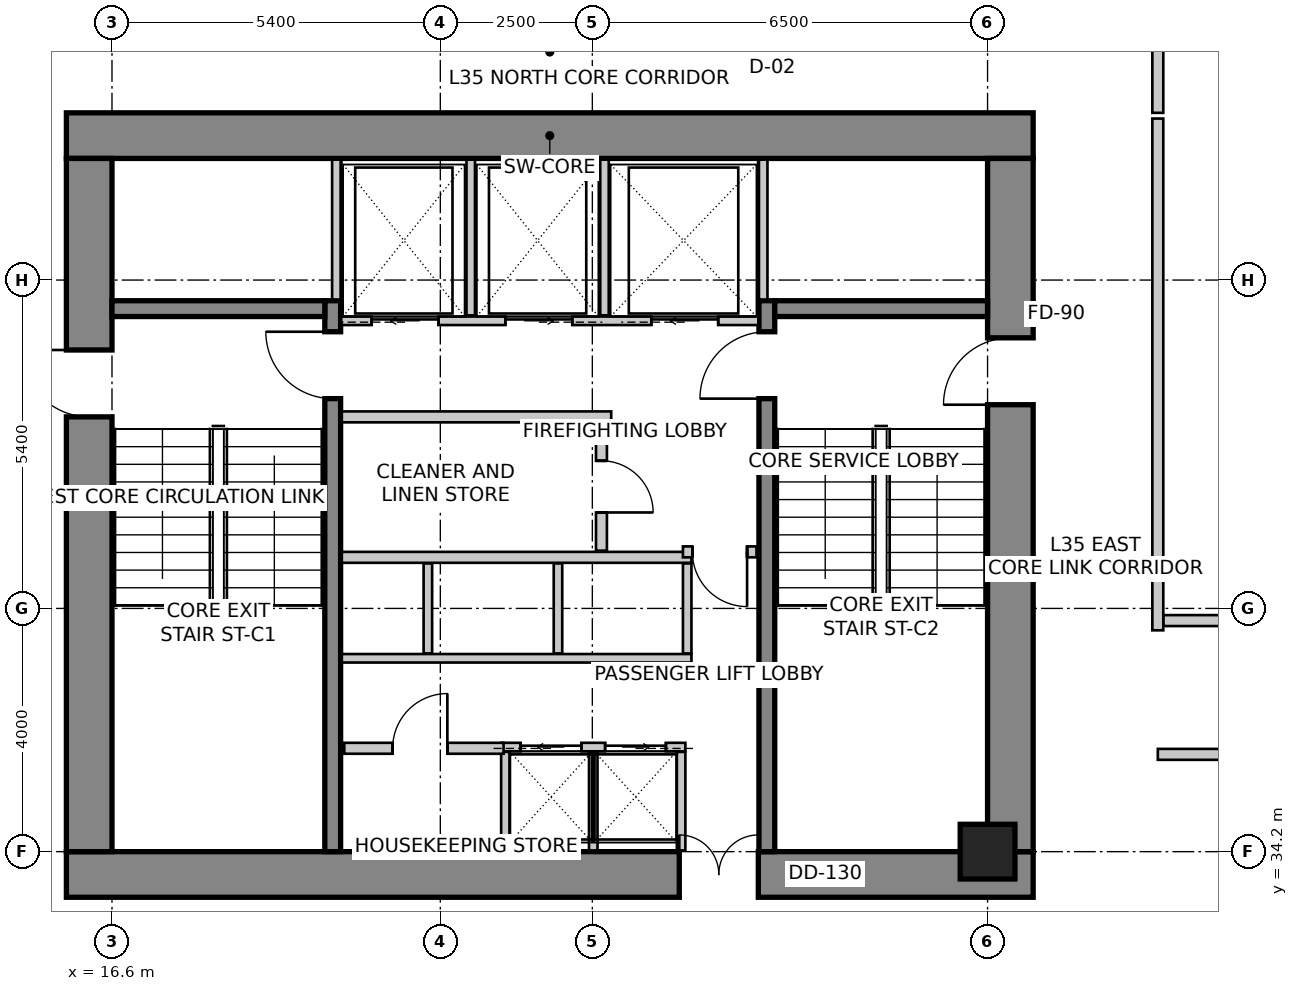
"""IFC4 building model, lengths in metres.
Left out: names, types, materials, properties, quantities, classifications, styles, units other than length and angle.
Written with IfcOpenShell. Run it as: python <this file> out.ifc"""

import sys

from ifc_helpers import new_model, si_unit, direction, frame, frame_2d, origin, origin_2d, place, context, subcontext, project, spatial, rectangle, extrude, source, transform, mapped, element, fill, save


model = new_model("IFC4")
c1 = context("Model", 3, precision=1e-05, world=origin(), true_north=direction((0.0, 1.0)))
c2 = subcontext(c1, "Body", "Model", "MODEL_VIEW")
j1 = project(units=[si_unit("LENGTHUNIT", "METRE"), si_unit("PLANEANGLEUNIT", "RADIAN")], contexts=[c1])
p1 = place(None, origin())
s1 = spatial("IfcSite", under=j1, at=p1, CompositionType="ELEMENT")
p2 = place(p1, origin())
s2 = spatial("IfcBuilding", under=s1, at=p2, CompositionType="ELEMENT")
p3 = place(p2, frame((0.0, 0.0, 143.0)))
s3 = spatial("IfcBuildingStorey", under=s2, at=p3, CompositionType="ELEMENT", Elevation=143.0)
p4 = place(p3, frame((15.85, 45.975, 0.0), z_axis=(0.0, 0.0, 1.0), x_axis=(1.0, 0.0, 0.0)))
e1 = element("IfcWall", 1, at=p4, inside=s3, PredefinedType="SHEAR", context=c2, shape_type="SweptSolid", body=[
    extrude(rectangle(XDim=15.9, YDim=0.75, at=frame_2d((7.95, 0.0))), origin(), (0.0, 0.0, 1.0), 3.6),
])
p5 = place(p3, frame((15.85, 33.825, 0.0), z_axis=(0.0, 0.0, 1.0), x_axis=(1.0, 0.0, 0.0)))
e2 = element("IfcWall", 2, at=p5, inside=s3, PredefinedType="SHEAR", context=c2, shape_type="SweptSolid", body=[
    extrude(rectangle(XDim=15.9, YDim=0.75, at=frame_2d((7.95, 0.0))), origin(), (0.0, 0.0, 1.0), 3.6),
])
m1 = source(origin(), c2, "Body", "SweptSolid", [
    extrude(rectangle(XDim=1.3, YDim=2.15, at=frame_2d((0.65, 1.075))), frame((0.0, 0.385, 0.0), z_axis=(0.0, -1.0, 0.0), x_axis=(1.0, 0.0, 0.0)), (0.0, 0.0, 1.0), 0.77),
])
p6 = place(p5, frame((10.08, 0.0, 0.0)))
e3 = element("IfcOpeningElement", 3, at=p6, cuts=e2, PredefinedType="OPENING", context=c2, shape_type="MappedRepresentation", body=[
    mapped(m1, transform((0.0, 0.0, 0.0), scale=1.0)),
])
p7 = place(p3, frame((16.225, 34.2, 0.0), z_axis=(0.0, 0.0, 1.0), x_axis=(0.0, 1.0, 0.0)))
e4 = element("IfcWall", 4, at=p7, inside=s3, PredefinedType="SHEAR", context=c2, shape_type="SweptSolid", body=[
    extrude(rectangle(XDim=11.4, YDim=0.75, at=frame_2d((5.7, 0.0))), origin(), (0.0, 0.0, 1.0), 3.6),
])
m2 = source(origin(), c2, "Body", "SweptSolid", [
    extrude(rectangle(XDim=1.1, YDim=2.15, at=frame_2d((0.55, 1.075))), frame((0.0, 0.385, 0.0), z_axis=(0.0, -1.0, 0.0), x_axis=(1.0, 0.0, 0.0)), (0.0, 0.0, 1.0), 0.77),
])
p8 = place(p7, frame((7.15, 0.0, 0.0)))
e5 = element("IfcOpeningElement", 5, at=p8, cuts=e4, PredefinedType="OPENING", context=c2, shape_type="MappedRepresentation", body=[
    mapped(m2, transform((0.0, 0.0, 0.0), scale=1.0)),
])
p9 = place(p3, frame((31.375, 34.2, 0.0), z_axis=(0.0, 0.0, 1.0), x_axis=(0.0, 1.0, 0.0)))
e6 = element("IfcWall", 6, at=p9, inside=s3, PredefinedType="SHEAR", context=c2, shape_type="SweptSolid", body=[
    extrude(rectangle(XDim=11.4, YDim=0.75, at=frame_2d((5.7, 0.0))), origin(), (0.0, 0.0, 1.0), 3.6),
])
p10 = place(p9, frame((7.35, 0.0, 0.0)))
e7 = element("IfcOpeningElement", 7, at=p10, cuts=e6, PredefinedType="OPENING", context=c2, shape_type="MappedRepresentation", body=[
    mapped(m2, transform((0.0, 0.0, 0.0), scale=1.0)),
])
p11 = place(p3, frame((20.23, 34.2, 0.0), z_axis=(0.0, 0.0, 1.0), x_axis=(0.0, 1.0, 0.0)))
e8 = element("IfcWall", 8, at=p11, inside=s3, PredefinedType="SHEAR", context=c2, shape_type="SweptSolid", body=[
    extrude(rectangle(XDim=9.06, YDim=0.26, at=frame_2d((4.53, 0.0))), origin(), (0.0, 0.0, 1.0), 3.6),
])
m3 = source(origin(), c2, "Body", "SweptSolid", [
    extrude(rectangle(XDim=1.1, YDim=2.15, at=frame_2d((0.55, 1.075))), frame((0.0, 0.14, 0.0), z_axis=(0.0, -1.0, 0.0), x_axis=(1.0, 0.0, 0.0)), (0.0, 0.0, 1.0), 0.28),
])
p12 = place(p11, frame((7.45, 0.0, 0.0)))
e9 = element("IfcOpeningElement", 9, at=p12, cuts=e8, PredefinedType="OPENING", context=c2, shape_type="MappedRepresentation", body=[
    mapped(m3, transform((0.0, 0.0, 0.0), scale=1.0)),
])
p13 = place(p3, frame((27.37, 34.2, 0.0), z_axis=(0.0, 0.0, 1.0), x_axis=(0.0, 1.0, 0.0)))
e10 = element("IfcWall", 10, at=p13, inside=s3, PredefinedType="SHEAR", context=c2, shape_type="SweptSolid", body=[
    extrude(rectangle(XDim=9.06, YDim=0.26, at=frame_2d((4.53, 0.0))), origin(), (0.0, 0.0, 1.0), 3.6),
])
p14 = place(p13, frame((7.45, 0.0, 0.0)))
e11 = element("IfcOpeningElement", 11, at=p14, cuts=e10, PredefinedType="OPENING", context=c2, shape_type="MappedRepresentation", body=[
    mapped(m3, transform((0.0, 0.0, 0.0), scale=1.0)),
])
for number, where, z_axis, x_axis in (
    (12, (16.6, 43.13, 0.0), (0.0, 0.0, 1.0), (1.0, 0.0, 0.0)),
    (13, (27.5, 43.13, 0.0), (0.0, 0.0, 1.0), (1.0, 0.0, 0.0)),
):
    element("IfcWall", number, at=place(p3, frame(where, z_axis=z_axis, x_axis=x_axis)), inside=s3, PredefinedType="SHEAR", context=c2, shape_type="SweptSolid", body=[
        extrude(rectangle(XDim=3.5, YDim=0.26, at=frame_2d((1.75, 0.0))), origin(), (0.0, 0.0, 1.0), 3.6),
    ])
m4 = source(origin(), c2, "Body", "SweptSolid", [
    extrude(rectangle(XDim=0.9, YDim=0.9, at=origin_2d()), origin(), (0.0, 0.0, 1.0), 3.6),
])
p15 = place(p3, frame((31.0, 34.2, 0.0), z_axis=(0.0, 0.0, 1.0), x_axis=(1.0, 0.0, 0.0)))
e14 = element("IfcColumn", 14, at=p15, inside=s3, PredefinedType="COLUMN", context=c2, shape_type="MappedRepresentation", body=[
    mapped(m4, transform((0.0, 0.0, 0.0), scale=1.0)),
])
p16 = place(p3, frame((21.875, 52.742, 0.0), z_axis=(0.0, 0.0, 1.0), x_axis=(-0.843662465249, -0.536873956092, 0.0)))
e15 = element("IfcWall", 15, at=p16, inside=s3, PredefinedType="SOLIDWALL", context=c2, shape_type="SweptSolid", body=[
    extrude(rectangle(XDim=10.284, YDim=0.3, at=frame_2d((5.142, 0.0))), origin(), (0.0, 0.0, 1.0), 3.35),
])
m5 = source(origin(), c2, "Body", "SweptSolid", [
    extrude(rectangle(XDim=2.4, YDim=2.2, at=frame_2d((1.2, 1.1))), frame((0.0, 0.16, 0.0), z_axis=(0.0, -1.0, 0.0), x_axis=(1.0, 0.0, 0.0)), (0.0, 0.0, 1.0), 0.32),
])
p17 = place(p16, frame((2.656, 0.0, 0.85)))
e16 = element("IfcOpeningElement", 16, at=p17, cuts=e15, PredefinedType="OPENING", context=c2, shape_type="MappedRepresentation", body=[
    mapped(m5, transform((0.0, 0.0, 0.0), scale=1.0)),
])
m6 = source(origin(), c2, "Body", "SweptSolid", [
    extrude(rectangle(XDim=1.5, YDim=1.8, at=frame_2d((0.75, 0.9))), frame((0.0, 0.16, 0.0), z_axis=(0.0, -1.0, 0.0), x_axis=(1.0, 0.0, 0.0)), (0.0, 0.0, 1.0), 0.32),
])
p18 = place(p16, frame((7.937, 0.0, 0.85)))
e17 = element("IfcOpeningElement", 17, at=p18, cuts=e15, PredefinedType="OPENING", context=c2, shape_type="MappedRepresentation", body=[
    mapped(m6, transform((0.0, 0.0, 0.0), scale=1.0)),
])
p19 = place(p3, frame((20.37, 42.93, 0.0), z_axis=(0.0, 0.0, 1.0), x_axis=(1.0, 0.0, 0.0)))
e18 = element("IfcWall", 18, at=p19, inside=s3, PredefinedType="SOLIDWALL", context=c2, shape_type="SweptSolid", body=[
    extrude(rectangle(XDim=6.86, YDim=0.14, at=frame_2d((3.43, 0.0))), origin(), (0.0, 0.0, 1.0), 3.35),
])
m7 = source(origin(), c2, "Body", "SweptSolid", [
    extrude(rectangle(XDim=1.1, YDim=2.15, at=frame_2d((0.55, 1.075))), frame((0.0, 0.08, 0.0), z_axis=(0.0, -1.0, 0.0), x_axis=(1.0, 0.0, 0.0)), (0.0, 0.0, 1.0), 0.16),
])
p20 = place(p19, frame((0.5, 0.0, 0.0)))
e19 = element("IfcOpeningElement", 19, at=p20, cuts=e18, PredefinedType="OPENING", context=c2, shape_type="MappedRepresentation", body=[
    mapped(m7, transform((0.0, 0.0, 0.0), scale=1.0)),
])
p21 = place(p19, frame((2.7, 0.0, 0.0)))
e20 = element("IfcOpeningElement", 20, at=p21, cuts=e18, PredefinedType="OPENING", context=c2, shape_type="MappedRepresentation", body=[
    mapped(m7, transform((0.0, 0.0, 0.0), scale=1.0)),
])
p22 = place(p19, frame((5.1, 0.0, 0.0)))
e21 = element("IfcOpeningElement", 21, at=p22, cuts=e18, PredefinedType="OPENING", context=c2, shape_type="MappedRepresentation", body=[
    mapped(m7, transform((0.0, 0.0, 0.0), scale=1.0)),
])
for number, where, z_axis, x_axis in (
    (22, (20.29, 43.28, 0.0), (0.0, 0.0, 1.0), (0.0, 1.0, 0.0)),
    (23, (27.31, 43.28, 0.0), (0.0, 0.0, 1.0), (0.0, 1.0, 0.0)),
):
    element("IfcWall", number, at=place(p3, frame(where, z_axis=z_axis, x_axis=x_axis)), inside=s3, PredefinedType="SOLIDWALL", context=c2, shape_type="SweptSolid", body=[
        extrude(rectangle(XDim=2.3, YDim=0.14, at=frame_2d((1.15, 0.0))), origin(), (0.0, 0.0, 1.0), 3.35),
    ])
for number, where, z_axis, x_axis in (
    (24, (22.5, 43.02, 0.0), (0.0, 0.0, 1.0), (0.0, 1.0, 0.0)),
    (25, (24.7, 43.02, 0.0), (0.0, 0.0, 1.0), (0.0, 1.0, 0.0)),
):
    element("IfcWall", number, at=place(p3, frame(where, z_axis=z_axis, x_axis=x_axis)), inside=s3, PredefinedType="SOLIDWALL", context=c2, shape_type="SweptSolid", body=[
        extrude(rectangle(XDim=2.56, YDim=0.14, at=frame_2d((1.28, 0.0))), origin(), (0.0, 0.0, 1.0), 3.35),
    ])
p23 = place(p3, frame((23.0, 35.92, 0.0), z_axis=(0.0, 0.0, 1.0), x_axis=(1.0, 0.0, 0.0)))
e26 = element("IfcWall", 26, at=p23, inside=s3, PredefinedType="SOLIDWALL", context=c2, shape_type="SweptSolid", body=[
    extrude(rectangle(XDim=3.03, YDim=0.14, at=frame_2d((1.515, 0.0))), origin(), (0.0, 0.0, 1.0), 3.35),
])
m8 = source(origin(), c2, "Body", "SweptSolid", [
    extrude(rectangle(XDim=1.0, YDim=2.15, at=frame_2d((0.5, 1.075))), frame((0.0, 0.08, 0.0), z_axis=(0.0, -1.0, 0.0), x_axis=(1.0, 0.0, 0.0)), (0.0, 0.0, 1.0), 0.16),
])
p24 = place(p23, frame((0.32, 0.0, 0.0)))
e27 = element("IfcOpeningElement", 27, at=p24, cuts=e26, PredefinedType="OPENING", context=c2, shape_type="MappedRepresentation", body=[
    mapped(m8, transform((0.0, 0.0, 0.0), scale=1.0)),
])
p25 = place(p23, frame((1.71, 0.0, 0.0)))
e28 = element("IfcOpeningElement", 28, at=p25, cuts=e26, PredefinedType="OPENING", context=c2, shape_type="MappedRepresentation", body=[
    mapped(m8, transform((0.0, 0.0, 0.0), scale=1.0)),
])
for number, where, z_axis, x_axis in (
    (29, (25.96, 34.22, 0.0), (0.0, 0.0, 1.0), (0.0, 1.0, 0.0)),
    (30, (23.07, 34.22, 0.0), (0.0, 0.0, 1.0), (0.0, 1.0, 0.0)),
    (31, (24.515, 34.22, 0.0), (0.0, 0.0, 1.0), (0.0, 1.0, 0.0)),
):
    element("IfcWall", number, at=place(p3, frame(where, z_axis=z_axis, x_axis=x_axis)), inside=s3, PredefinedType="SOLIDWALL", context=c2, shape_type="SweptSolid", body=[
        extrude(rectangle(XDim=1.62, YDim=0.14, at=frame_2d((0.81, 0.0))), origin(), (0.0, 0.0, 1.0), 2.642),
    ])
p26 = place(p3, frame((20.38, 37.38, 0.0), z_axis=(0.0, 0.0, 1.0), x_axis=(1.0, 0.0, 0.0)))
e32 = element("IfcWall", 32, at=p26, inside=s3, PredefinedType="SOLIDWALL", context=c2, shape_type="SweptSolid", body=[
    extrude(rectangle(XDim=5.75, YDim=0.14, at=frame_2d((2.875, 0.0))), origin(), (0.0, 0.0, 1.0), 3.35),
])
p27 = place(p3, frame((20.38, 39.04, 0.0), z_axis=(0.0, 0.0, 1.0), x_axis=(1.0, 0.0, 0.0)))
e33 = element("IfcWall", 33, at=p27, inside=s3, PredefinedType="SOLIDWALL", context=c2, shape_type="SweptSolid", body=[
    extrude(rectangle(XDim=5.75, YDim=0.18, at=frame_2d((2.875, 0.0))), origin(), (0.0, 0.0, 1.0), 3.35),
])
for number, where, z_axis, x_axis in (
    (34, (26.06, 37.46, 0.0), (0.0, 0.0, 1.0), (0.0, 1.0, 0.0)),
    (35, (21.795, 37.46, 0.0), (0.0, 0.0, 1.0), (0.0, 1.0, 0.0)),
    (36, (23.935, 37.46, 0.0), (0.0, 0.0, 1.0), (0.0, 1.0, 0.0)),
):
    element("IfcWall", number, at=place(p3, frame(where, z_axis=z_axis, x_axis=x_axis)), inside=s3, PredefinedType="SOLIDWALL", context=c2, shape_type="SweptSolid", body=[
        extrude(rectangle(XDim=1.48, YDim=0.14, at=frame_2d((0.74, 0.0))), origin(), (0.0, 0.0, 1.0), 3.35),
    ])
p28 = place(p3, frame((24.81, 41.35, 0.0), z_axis=(0.0, 0.0, 1.0), x_axis=(-1.0, 0.0, 0.0)))
e37 = element("IfcWall", 37, at=p28, inside=s3, PredefinedType="PARTITIONING", context=c2, shape_type="SweptSolid", body=[
    extrude(rectangle(XDim=4.43, YDim=0.18, at=frame_2d((2.215, 0.0))), origin(), (0.0, 0.0, 1.0), 3.35),
])
p29 = place(p3, frame((24.65, 41.256, 0.0), z_axis=(0.0, 0.0, 1.0), x_axis=(0.0, -1.0, 0.0)))
e38 = element("IfcWall", 38, at=p29, inside=s3, PredefinedType="PARTITIONING", context=c2, shape_type="SweptSolid", body=[
    extrude(rectangle(XDim=2.106, YDim=0.18, at=frame_2d((1.053, 0.0))), origin(), (0.0, 0.0, 1.0), 3.35),
])
m9 = source(origin(), c2, "Body", "SweptSolid", [
    extrude(rectangle(XDim=0.85, YDim=2.15, at=frame_2d((0.425, 1.075))), frame((0.0, 0.1, 0.0), z_axis=(0.0, -1.0, 0.0), x_axis=(1.0, 0.0, 0.0)), (0.0, 0.0, 1.0), 0.2),
])
p30 = place(p29, frame((0.628, 0.0, 0.0)))
e39 = element("IfcOpeningElement", 39, at=p30, cuts=e38, PredefinedType="OPENING", context=c2, shape_type="MappedRepresentation", body=[
    mapped(m9, transform((0.0, 0.0, 0.0), scale=1.0)),
])
p31 = place(p3, frame((27.2, 39.13, 0.0), z_axis=(0.0, 0.0, 1.0), x_axis=(-1.0, 0.0, 0.0)))
e40 = element("IfcWall", 40, at=p31, inside=s3, PredefinedType="PARTITIONING", context=c2, shape_type="SweptSolid", body=[
    extrude(rectangle(XDim=1.21, YDim=0.18, at=frame_2d((0.605, 0.0))), origin(), (0.0, 0.0, 1.0), 3.35),
])
m10 = source(origin(), c2, "Body", "SweptSolid", [
    extrude(rectangle(XDim=0.9, YDim=2.15, at=frame_2d((0.45, 1.075))), frame((0.0, 0.1, 0.0), z_axis=(0.0, -1.0, 0.0), x_axis=(1.0, 0.0, 0.0)), (0.0, 0.0, 1.0), 0.2),
])
p32 = place(p31, frame((0.155, 0.0, 0.0)))
e41 = element("IfcOpeningElement", 41, at=p32, cuts=e40, PredefinedType="OPENING", context=c2, shape_type="MappedRepresentation", body=[
    mapped(m10, transform((0.0, 0.0, 0.0), scale=1.0)),
])
p33 = place(p3, frame((20.42, 35.9, 0.0), z_axis=(0.0, 0.0, 1.0), x_axis=(1.0, 0.0, 0.0)))
e42 = element("IfcWall", 42, at=p33, inside=s3, PredefinedType="PARTITIONING", context=c2, shape_type="SweptSolid", body=[
    extrude(rectangle(XDim=2.62, YDim=0.18, at=frame_2d((1.31, 0.0))), origin(), (0.0, 0.0, 1.0), 3.35),
])
p34 = place(p33, frame((0.796, 0.0, 0.0)))
e43 = element("IfcOpeningElement", 43, at=p34, cuts=e42, PredefinedType="OPENING", context=c2, shape_type="MappedRepresentation", body=[
    mapped(m10, transform((0.0, 0.0, 0.0), scale=1.0)),
])
p35 = place(p3, frame((33.8, 48.5, 0.0), z_axis=(0.0, 0.0, 1.0), x_axis=(0.0, -1.0, 0.0)))
e44 = element("IfcWall", 44, at=p35, inside=s3, PredefinedType="PARTITIONING", context=c2, shape_type="SweptSolid", body=[
    extrude(rectangle(XDim=2.15, YDim=0.18, at=frame_2d((1.075, 0.0))), origin(), (0.0, 0.0, 1.0), 2.492),
])
p36 = place(p3, frame((33.8, 46.256, 0.0), z_axis=(0.0, 0.0, 1.0), x_axis=(0.0, -1.0, 0.0)))
e45 = element("IfcWall", 45, at=p36, inside=s3, PredefinedType="PARTITIONING", context=c2, shape_type="SweptSolid", body=[
    extrude(rectangle(XDim=8.416, YDim=0.18, at=frame_2d((4.208, 0.0))), origin(), (0.0, 0.0, 1.0), 2.922),
])
p37 = place(p3, frame((33.894, 38.0, 0.0), z_axis=(0.0, 0.0, 1.0), x_axis=(1.0, 0.0, 0.0)))
e46 = element("IfcWall", 46, at=p37, inside=s3, PredefinedType="PARTITIONING", context=c2, shape_type="SweptSolid", body=[
    extrude(rectangle(XDim=7.933, YDim=0.18, at=frame_2d((3.966, 0.0))), origin(), (0.0, 0.0, 1.0), 2.803),
])
p38 = place(p37, frame((3.455, 0.0, 0.0)))
e47 = element("IfcOpeningElement", 47, at=p38, cuts=e46, PredefinedType="OPENING", context=c2, shape_type="MappedRepresentation", body=[
    mapped(m10, transform((0.0, 0.0, 0.0), scale=1.0)),
])
p39 = place(p3, frame((49.441, 35.8, 0.0), z_axis=(0.0, 0.0, 1.0), x_axis=(-1.0, 0.0, 0.0)))
e48 = element("IfcWall", 48, at=p39, inside=s3, PredefinedType="PARTITIONING", context=c2, shape_type="SweptSolid", body=[
    extrude(rectangle(XDim=15.641, YDim=0.18, at=frame_2d((7.82, 0.0))), origin(), (0.0, 0.0, 1.0), 2.803),
])
p40 = place(p39, frame((7.371, 0.0, 0.0)))
e49 = element("IfcOpeningElement", 49, at=p40, cuts=e48, PredefinedType="OPENING", context=c2, shape_type="MappedRepresentation", body=[
    mapped(m10, transform((0.0, 0.0, 0.0), scale=1.0)),
])
m11 = source(origin(), c2, "Body", "SweptSolid", [
    extrude(rectangle(XDim=1.1, YDim=2.15, at=frame_2d((0.55, 1.075))), frame((0.0, 0.025, 0.0), z_axis=(0.0, -1.0, 0.0), x_axis=(1.0, 0.0, 0.0)), (0.0, 0.0, 1.0), 0.05),
])
p41 = place(p20, origin())
e50 = element("IfcDoor", 50, at=p41, inside=s3, OperationType="SLIDING_TO_LEFT", PredefinedType="DOOR", context=c2, shape_type="MappedRepresentation", body=[
    mapped(m11, transform((0.0, 0.0, 0.0), scale=1.0)),
])
fill(e19, e50)
p42 = place(p21, origin())
e51 = element("IfcDoor", 51, at=p42, inside=s3, OperationType="SLIDING_TO_RIGHT", PredefinedType="DOOR", context=c2, shape_type="MappedRepresentation", body=[
    mapped(m11, transform((0.0, 0.0, 0.0), scale=1.0)),
])
fill(e20, e51)
m12 = source(origin(), c2, "Body", "SweptSolid", [
    extrude(rectangle(XDim=1.1, YDim=2.15, at=frame_2d((0.55, 1.075))), frame((0.0, 0.025, 0.0), z_axis=(0.0, -1.0, 0.0), x_axis=(1.0, 0.0, 0.0)), (0.0, 0.0, 1.0), 0.05),
])
p43 = place(p22, origin())
e52 = element("IfcDoor", 52, at=p43, inside=s3, OperationType="SLIDING_TO_LEFT", PredefinedType="DOOR", context=c2, shape_type="MappedRepresentation", body=[
    mapped(m12, transform((0.0, 0.0, 0.0), scale=1.0)),
])
fill(e21, e52)
m13 = source(origin(), c2, "Body", "SweptSolid", [
    extrude(rectangle(XDim=1.0, YDim=2.15, at=frame_2d((0.5, 1.075))), frame((0.0, 0.025, 0.0), z_axis=(0.0, -1.0, 0.0), x_axis=(1.0, 0.0, 0.0)), (0.0, 0.0, 1.0), 0.05),
])
p44 = place(p24, origin())
e53 = element("IfcDoor", 53, at=p44, inside=s3, OperationType="SLIDING_TO_LEFT", PredefinedType="DOOR", context=c2, shape_type="MappedRepresentation", body=[
    mapped(m13, transform((0.0, 0.0, 0.0), scale=1.0)),
])
fill(e27, e53)
p45 = place(p25, origin())
e54 = element("IfcDoor", 54, at=p45, inside=s3, OperationType="SLIDING_TO_RIGHT", PredefinedType="DOOR", context=c2, shape_type="MappedRepresentation", body=[
    mapped(m13, transform((0.0, 0.0, 0.0), scale=1.0)),
])
fill(e28, e54)
m14 = source(origin(), c2, "Body", "SweptSolid", [
    extrude(rectangle(XDim=1.1, YDim=2.15, at=frame_2d((0.55, 1.075))), frame((0.0, 0.025, 0.0), z_axis=(0.0, -1.0, 0.0), x_axis=(1.0, 0.0, 0.0)), (0.0, 0.0, 1.0), 0.05),
])
p46 = place(p12, origin())
e55 = element("IfcDoor", 55, at=p46, inside=s3, OperationType="SINGLE_SWING_RIGHT", PredefinedType="DOOR", context=c2, shape_type="MappedRepresentation", body=[
    mapped(m14, transform((0.0, 0.0, 0.0), scale=1.0)),
])
fill(e9, e55)
p47 = place(p14, origin())
e56 = element("IfcDoor", 56, at=p47, inside=s3, OperationType="SINGLE_SWING_LEFT", PredefinedType="DOOR", context=c2, shape_type="MappedRepresentation", body=[
    mapped(m14, transform((0.0, 0.0, 0.0), scale=1.0)),
])
fill(e11, e56)
p48 = place(p8, origin())
e57 = element("IfcDoor", 57, at=p48, inside=s3, OperationType="SINGLE_SWING_RIGHT", PredefinedType="DOOR", context=c2, shape_type="MappedRepresentation", body=[
    mapped(m14, transform((0.0, 0.0, 0.0), scale=1.0)),
])
fill(e5, e57)
p49 = place(p10, origin())
e58 = element("IfcDoor", 58, at=p49, inside=s3, OperationType="SINGLE_SWING_LEFT", PredefinedType="DOOR", context=c2, shape_type="MappedRepresentation", body=[
    mapped(m14, transform((0.0, 0.0, 0.0), scale=1.0)),
])
fill(e7, e58)
m15 = source(origin(), c2, "Body", "SweptSolid", [
    extrude(rectangle(XDim=1.3, YDim=2.15, at=frame_2d((0.65, 1.075))), frame((0.0, 0.025, 0.0), z_axis=(0.0, -1.0, 0.0), x_axis=(1.0, 0.0, 0.0)), (0.0, 0.0, 1.0), 0.05),
])
p50 = place(p6, origin())
e59 = element("IfcDoor", 59, at=p50, inside=s3, OperationType="DOUBLE_DOOR_SINGLE_SWING", PredefinedType="DOOR", context=c2, shape_type="MappedRepresentation", body=[
    mapped(m15, transform((0.0, 0.0, 0.0), scale=1.0)),
])
fill(e3, e59)
m16 = source(origin(), c2, "Body", "SweptSolid", [
    extrude(rectangle(XDim=0.85, YDim=2.15, at=frame_2d((0.425, 1.075))), frame((0.0, 0.025, 0.0), z_axis=(0.0, -1.0, 0.0), x_axis=(1.0, 0.0, 0.0)), (0.0, 0.0, 1.0), 0.05),
])
p51 = place(p30, origin())
e60 = element("IfcDoor", 60, at=p51, inside=s3, OperationType="SINGLE_SWING_RIGHT", PredefinedType="DOOR", context=c2, shape_type="MappedRepresentation", body=[
    mapped(m16, transform((0.0, 0.0, 0.0), scale=1.0)),
])
fill(e39, e60)
m17 = source(origin(), c2, "Body", "SweptSolid", [
    extrude(rectangle(XDim=0.9, YDim=2.15, at=frame_2d((0.45, 1.075))), frame((0.0, 0.025, 0.0), z_axis=(0.0, -1.0, 0.0), x_axis=(1.0, 0.0, 0.0)), (0.0, 0.0, 1.0), 0.05),
])
p52 = place(p32, origin())
e61 = element("IfcDoor", 61, at=p52, inside=s3, OperationType="SINGLE_SWING_LEFT", PredefinedType="DOOR", context=c2, shape_type="MappedRepresentation", body=[
    mapped(m17, transform((0.0, 0.0, 0.0), scale=1.0)),
])
fill(e41, e61)
p53 = place(p34, origin())
e62 = element("IfcDoor", 62, at=p53, inside=s3, OperationType="SINGLE_SWING_RIGHT", PredefinedType="DOOR", context=c2, shape_type="MappedRepresentation", body=[
    mapped(m17, transform((0.0, 0.0, 0.0), scale=1.0)),
])
fill(e43, e62)
save(model, sys.argv[1])
